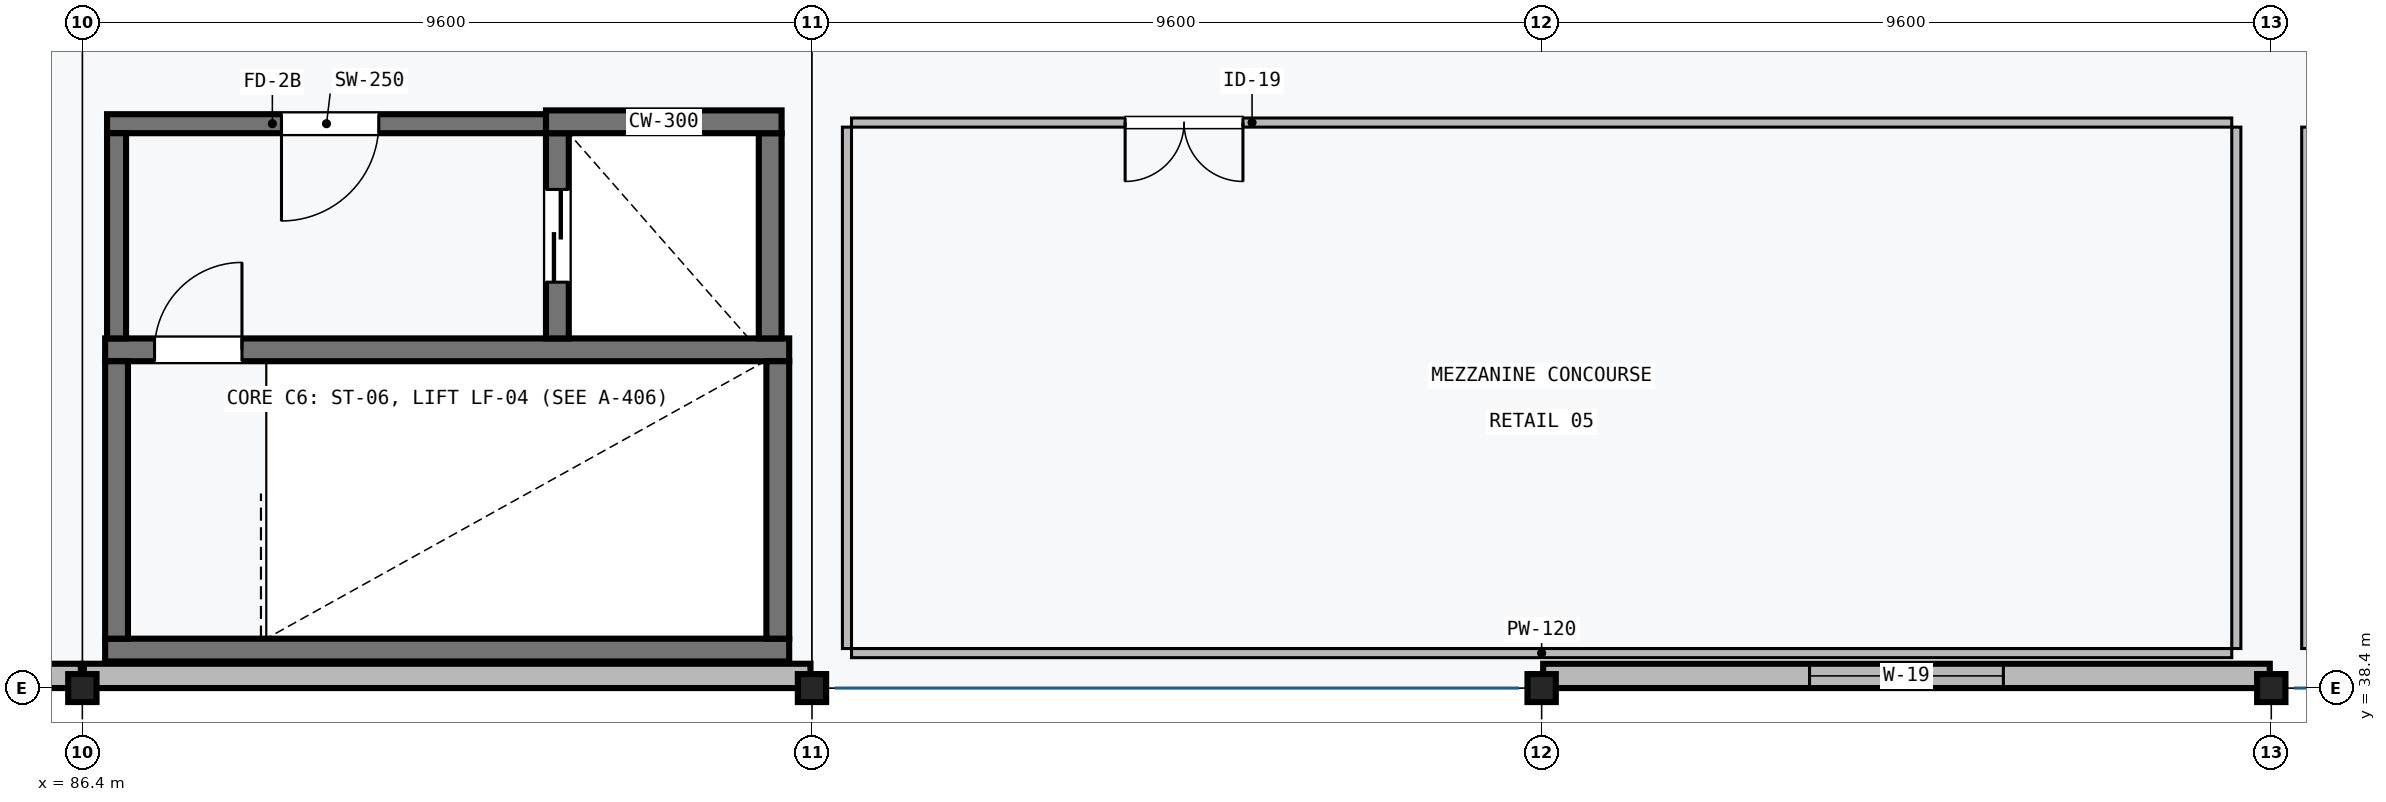
"""IFC4 building model, lengths in metres.
Left out: names, types, materials, properties, quantities, classifications, styles, units other than length and angle.
Written with IfcOpenShell. Run it as: python <this file> out.ifc"""

import sys

from ifc_helpers import new_model, si_unit, direction, frame, frame_2d, origin, origin_2d, place, context, subcontext, project, spatial, rectangle, i_section, extrude, element, fill, save


model = new_model("IFC4")
c1 = context("Model", 3, precision=1e-05, world=origin(), true_north=direction((0.0, 1.0)))
c2 = subcontext(c1, "Body", "Model", "MODEL_VIEW")
j1 = project(units=[si_unit("LENGTHUNIT", "METRE"), si_unit("PLANEANGLEUNIT", "RADIAN")], contexts=[c1])
p1 = place(None, origin())
s1 = spatial("IfcSite", under=j1, at=p1, CompositionType="ELEMENT")
p2 = place(p1, origin())
s2 = spatial("IfcBuilding", under=s1, at=p2, CompositionType="ELEMENT")
p3 = place(p2, frame((0.0, 0.0, 6.0)))
s3 = spatial("IfcBuildingStorey", under=s2, at=p3, CompositionType="ELEMENT", Elevation=6.0)
for number, where, z_axis, x_axis in (
    (1, (86.4, 38.4, 0.0), (0.0, 0.0, 1.0), (1.0, 0.0, 0.0)),
    (2, (96.0, 38.4, 0.0), (0.0, 0.0, 1.0), (1.0, 0.0, 0.0)),
    (3, (105.6, 38.4, 0.0), (0.0, 0.0, 1.0), (1.0, 0.0, 0.0)),
    (4, (115.2, 38.4, 0.0), (0.0, 0.0, 1.0), (1.0, 0.0, 0.0)),
):
    element("IfcColumn", number, at=place(p3, frame(where, z_axis=z_axis, x_axis=x_axis)), inside=s3, PredefinedType="COLUMN", context=c2, shape_type="SweptSolid", body=[
        extrude(i_section(OverallWidth=0.373, OverallDepth=0.368, WebThickness=0.014, FlangeThickness=0.024, FilletRadius=0.015, at=origin_2d()), origin(), (0.0, 0.0, 1.0), 4.55),
    ])
p4 = place(p3, frame((86.7, 38.9, 0.0), z_axis=(0.0, 0.0, 1.0), x_axis=(1.0, 0.0, 0.0)))
e5 = element("IfcWall", 5, at=p4, inside=s3, PredefinedType="SHEAR", context=c2, shape_type="SweptSolid", body=[
    extrude(rectangle(XDim=9.0, YDim=0.3, at=frame_2d((4.5, 0.0))), origin(), (0.0, 0.0, 1.0), 4.25),
])
p5 = place(p3, frame((95.7, 42.85, 0.0), z_axis=(0.0, 0.0, 1.0), x_axis=(-1.0, 0.0, 0.0)))
e6 = element("IfcWall", 6, at=p5, inside=s3, PredefinedType="SHEAR", context=c2, shape_type="SweptSolid", body=[
    extrude(rectangle(XDim=9.0, YDim=0.3, at=frame_2d((4.5, 0.0))), origin(), (0.0, 0.0, 1.0), 4.5),
])
p6 = place(p5, frame((7.2, 0.0, 0.0)))
e7 = element("IfcOpeningElement", 7, at=p6, cuts=e6, PredefinedType="OPENING", context=c2, shape_type="SweptSolid", body=[
    extrude(rectangle(XDim=1.15, YDim=2.15, at=frame_2d((0.575, 1.075))), frame((0.0, 0.16, 0.0), z_axis=(0.0, -1.0, 0.0), x_axis=(1.0, 0.0, 0.0)), (0.0, 0.0, 1.0), 0.32),
])
for number, where, z_axis, x_axis in (
    (8, (86.85, 39.05, 0.0), (0.0, 0.0, 1.0), (0.0, 1.0, 0.0)),
    (9, (95.55, 42.7, 0.0), (0.0, 0.0, 1.0), (0.0, -1.0, 0.0)),
):
    element("IfcWall", number, at=place(p3, frame(where, z_axis=z_axis, x_axis=x_axis)), inside=s3, PredefinedType="SHEAR", context=c2, shape_type="SweptSolid", body=[
        extrude(rectangle(XDim=3.65, YDim=0.3, at=frame_2d((1.825, 0.0))), origin(), (0.0, 0.0, 1.0), 4.25),
    ])
p7 = place(p3, frame((92.65, 45.7, 0.0), z_axis=(0.0, 0.0, 1.0), x_axis=(0.0, -1.0, 0.0)))
e10 = element("IfcWall", 10, at=p7, inside=s3, PredefinedType="SHEAR", context=c2, shape_type="SweptSolid", body=[
    extrude(rectangle(XDim=2.7, YDim=0.3, at=frame_2d((1.35, 0.0))), origin(), (0.0, 0.0, 1.0), 4.5),
])
p8 = place(p7, frame((0.74, 0.0, 0.0)))
e11 = element("IfcOpeningElement", 11, at=p8, cuts=e10, PredefinedType="OPENING", context=c2, shape_type="SweptSolid", body=[
    extrude(rectangle(XDim=1.22, YDim=2.15, at=frame_2d((0.61, 1.075))), frame((0.0, 0.16, 0.0), z_axis=(0.0, -1.0, 0.0), x_axis=(1.0, 0.0, 0.0)), (0.0, 0.0, 1.0), 0.32),
])
p9 = place(p3, frame((95.45, 43.0, 0.0), z_axis=(0.0, 0.0, 1.0), x_axis=(0.0, 1.0, 0.0)))
e12 = element("IfcWall", 12, at=p9, inside=s3, PredefinedType="SHEAR", context=c2, shape_type="SweptSolid", body=[
    extrude(rectangle(XDim=2.7, YDim=0.3, at=frame_2d((1.35, 0.0))), origin(), (0.0, 0.0, 1.0), 4.5),
])
p10 = place(p3, frame((92.5, 45.85, 0.0), z_axis=(0.0, 0.0, 1.0), x_axis=(1.0, 0.0, 0.0)))
e13 = element("IfcWall", 13, at=p10, inside=s3, PredefinedType="SHEAR", context=c2, shape_type="SweptSolid", body=[
    extrude(rectangle(XDim=3.1, YDim=0.3, at=frame_2d((1.55, 0.0))), origin(), (0.0, 0.0, 1.0), 4.5),
])
p11 = place(p3, frame((92.5, 45.825, 0.0), z_axis=(0.0, 0.0, 1.0), x_axis=(-1.0, 0.0, 0.0)))
e14 = element("IfcWall", 14, at=p11, inside=s3, PredefinedType="SHEAR", context=c2, shape_type="SweptSolid", body=[
    extrude(rectangle(XDim=5.775, YDim=0.25, at=frame_2d((2.887, 0.0))), origin(), (0.0, 0.0, 1.0), 4.25),
])
p12 = place(p11, frame((2.2, 0.0, 0.0)))
e15 = element("IfcOpeningElement", 15, at=p12, cuts=e14, PredefinedType="OPENING", context=c2, shape_type="SweptSolid", body=[
    extrude(rectangle(XDim=1.28, YDim=2.2, at=frame_2d((0.64, 1.1))), frame((0.0, 0.135, 0.0), z_axis=(0.0, -1.0, 0.0), x_axis=(1.0, 0.0, 0.0)), (0.0, 0.0, 1.0), 0.27),
])
p13 = place(p3, frame((86.85, 43.0, 0.0), z_axis=(0.0, 0.0, 1.0), x_axis=(0.0, 1.0, 0.0)))
e16 = element("IfcWall", 16, at=p13, inside=s3, PredefinedType="SHEAR", context=c2, shape_type="SweptSolid", body=[
    extrude(rectangle(XDim=2.7, YDim=0.25, at=frame_2d((1.35, 0.0))), origin(), (0.0, 0.0, 1.0), 4.25),
])
p14 = place(p3, frame((86.38, 38.56, 0.0), z_axis=(0.0, 0.0, 1.0), x_axis=(-1.0, 0.0, 0.0)))
e17 = element("IfcWall", 17, at=p14, inside=s3, PredefinedType="SOLIDWALL", context=c2, shape_type="SweptSolid", body=[
    extrude(rectangle(XDim=9.56, YDim=0.32, at=frame_2d((4.78, 0.0))), origin(), (0.0, 0.0, 1.0), 3.409),
])
p15 = place(p14, frame((2.98, 0.0, 1.3)))
e18 = element("IfcOpeningElement", 18, at=p15, cuts=e17, PredefinedType="OPENING", context=c2, shape_type="SweptSolid", body=[
    extrude(rectangle(XDim=3.6, YDim=1.2, at=frame_2d((1.8, 0.6))), frame((0.0, 0.17, 0.0), z_axis=(0.0, -1.0, 0.0), x_axis=(1.0, 0.0, 0.0)), (0.0, 0.0, 1.0), 0.34),
])
p16 = place(p3, frame((95.98, 38.56, 0.0), z_axis=(0.0, 0.0, 1.0), x_axis=(-1.0, 0.0, 0.0)))
e19 = element("IfcWall", 19, at=p16, inside=s3, PredefinedType="SOLIDWALL", context=c2, shape_type="SweptSolid", body=[
    extrude(rectangle(XDim=9.56, YDim=0.32, at=frame_2d((4.78, 0.0))), origin(), (0.0, 0.0, 1.0), 3.409),
])
p17 = place(p3, frame((115.18, 38.56, 0.0), z_axis=(0.0, 0.0, 1.0), x_axis=(-1.0, 0.0, 0.0)))
e20 = element("IfcWall", 20, at=p17, inside=s3, PredefinedType="SOLIDWALL", context=c2, shape_type="SweptSolid", body=[
    extrude(rectangle(XDim=9.56, YDim=0.32, at=frame_2d((4.78, 0.0))), origin(), (0.0, 0.0, 1.0), 3.409),
])
p18 = place(p17, frame((3.505, 0.0, 0.9)))
e21 = element("IfcOpeningElement", 21, at=p18, cuts=e20, PredefinedType="OPENING", context=c2, shape_type="SweptSolid", body=[
    extrude(rectangle(XDim=2.55, YDim=1.8, at=frame_2d((1.275, 0.9))), frame((0.0, 0.17, 0.0), z_axis=(0.0, -1.0, 0.0), x_axis=(1.0, 0.0, 0.0)), (0.0, 0.0, 1.0), 0.34),
])
p19 = place(p3, frame((114.68, 38.86, 0.0), z_axis=(0.0, 0.0, 1.0), x_axis=(-1.0, 0.0, 0.0)))
e22 = element("IfcWall", 22, at=p19, inside=s3, PredefinedType="PARTITIONING", context=c2, shape_type="SweptSolid", body=[
    extrude(rectangle(XDim=18.16, YDim=0.12, at=frame_2d((9.08, 0.0))), origin(), (0.0, 0.0, 1.0), 3.707),
])
p20 = place(p3, frame((96.52, 45.84, 0.0), z_axis=(0.0, 0.0, 1.0), x_axis=(1.0, 0.0, 0.0)))
e23 = element("IfcWall", 23, at=p20, inside=s3, PredefinedType="PARTITIONING", context=c2, shape_type="SweptSolid", body=[
    extrude(rectangle(XDim=18.16, YDim=0.12, at=frame_2d((9.08, 0.0))), origin(), (0.0, 0.0, 1.0), 3.707),
])
p21 = place(p20, frame((3.6, 0.0, 0.0)))
e24 = element("IfcOpeningElement", 24, at=p21, cuts=e23, PredefinedType="OPENING", context=c2, shape_type="SweptSolid", body=[
    extrude(rectangle(XDim=1.55, YDim=2.3, at=frame_2d((0.775, 1.15))), frame((0.0, 0.07, 0.0), z_axis=(0.0, -1.0, 0.0), x_axis=(1.0, 0.0, 0.0)), (0.0, 0.0, 1.0), 0.14),
])
for number, where, z_axis, x_axis in (
    (25, (96.46, 38.92, 0.0), (0.0, 0.0, 1.0), (0.0, 1.0, 0.0)),
    (26, (114.74, 45.78, 0.0), (0.0, 0.0, 1.0), (0.0, -1.0, 0.0)),
    (27, (115.66, 38.92, 0.0), (0.0, 0.0, 1.0), (0.0, 1.0, 0.0)),
):
    element("IfcWall", number, at=place(p3, frame(where, z_axis=z_axis, x_axis=x_axis)), inside=s3, PredefinedType="PARTITIONING", context=c2, shape_type="SweptSolid", body=[
        extrude(rectangle(XDim=6.86, YDim=0.12, at=frame_2d((3.43, 0.0))), origin(), (0.0, 0.0, 1.0), 3.89),
    ])
p22 = place(p6, frame((1.15, 0.0, 0.0), z_axis=(0.0, 0.0, 1.0), x_axis=(-1.0, 0.0, 0.0)))
e28 = element("IfcDoor", 28, at=p22, inside=s3, OperationType="SINGLE_SWING_LEFT", PredefinedType="DOOR", context=c2, shape_type="SweptSolid", body=[
    extrude(rectangle(XDim=1.15, YDim=2.15, at=frame_2d((0.575, 1.075))), frame((0.0, 0.025, 0.0), z_axis=(0.0, -1.0, 0.0), x_axis=(1.0, 0.0, 0.0)), (0.0, 0.0, 1.0), 0.05),
])
fill(e7, e28)
p23 = place(p8, frame((1.22, 0.0, 0.0), z_axis=(0.0, 0.0, 1.0), x_axis=(-1.0, 0.0, 0.0)))
e29 = element("IfcDoor", 29, at=p23, inside=s3, OperationType="DOUBLE_DOOR_SLIDING", PredefinedType="DOOR", context=c2, shape_type="SweptSolid", body=[
    extrude(rectangle(XDim=1.22, YDim=2.15, at=frame_2d((0.61, 1.075))), frame((0.0, 0.025, 0.0), z_axis=(0.0, -1.0, 0.0), x_axis=(1.0, 0.0, 0.0)), (0.0, 0.0, 1.0), 0.05),
])
fill(e11, e29)
p24 = place(p12, origin())
e30 = element("IfcDoor", 30, at=p24, inside=s3, OperationType="SINGLE_SWING_RIGHT", PredefinedType="DOOR", context=c2, shape_type="SweptSolid", body=[
    extrude(rectangle(XDim=1.28, YDim=2.2, at=frame_2d((0.64, 1.1))), frame((0.0, 0.025, 0.0), z_axis=(0.0, -1.0, 0.0), x_axis=(1.0, 0.0, 0.0)), (0.0, 0.0, 1.0), 0.05),
])
fill(e15, e30)
p25 = place(p18, origin())
e31 = element("IfcWindow", 31, at=p25, inside=s3, PartitioningType="SINGLE_PANEL", PredefinedType="WINDOW", context=c2, shape_type="SweptSolid", body=[
    extrude(rectangle(XDim=2.55, YDim=1.8, at=frame_2d((1.275, 0.9))), frame((0.0, 0.03, 0.0), z_axis=(0.0, -1.0, 0.0), x_axis=(1.0, 0.0, 0.0)), (0.0, 0.0, 1.0), 0.06),
])
fill(e21, e31)
p26 = place(p21, frame((1.55, 0.0, 0.0), z_axis=(0.0, 0.0, 1.0), x_axis=(-1.0, 0.0, 0.0)))
e32 = element("IfcDoor", 32, at=p26, inside=s3, OperationType="DOUBLE_DOOR_SINGLE_SWING", PredefinedType="DOOR", context=c2, shape_type="SweptSolid", body=[
    extrude(rectangle(XDim=1.55, YDim=2.3, at=frame_2d((0.775, 1.15))), frame((0.0, 0.025, 0.0), z_axis=(0.0, -1.0, 0.0), x_axis=(1.0, 0.0, 0.0)), (0.0, 0.0, 1.0), 0.05),
])
fill(e24, e32)
save(model, sys.argv[1])
